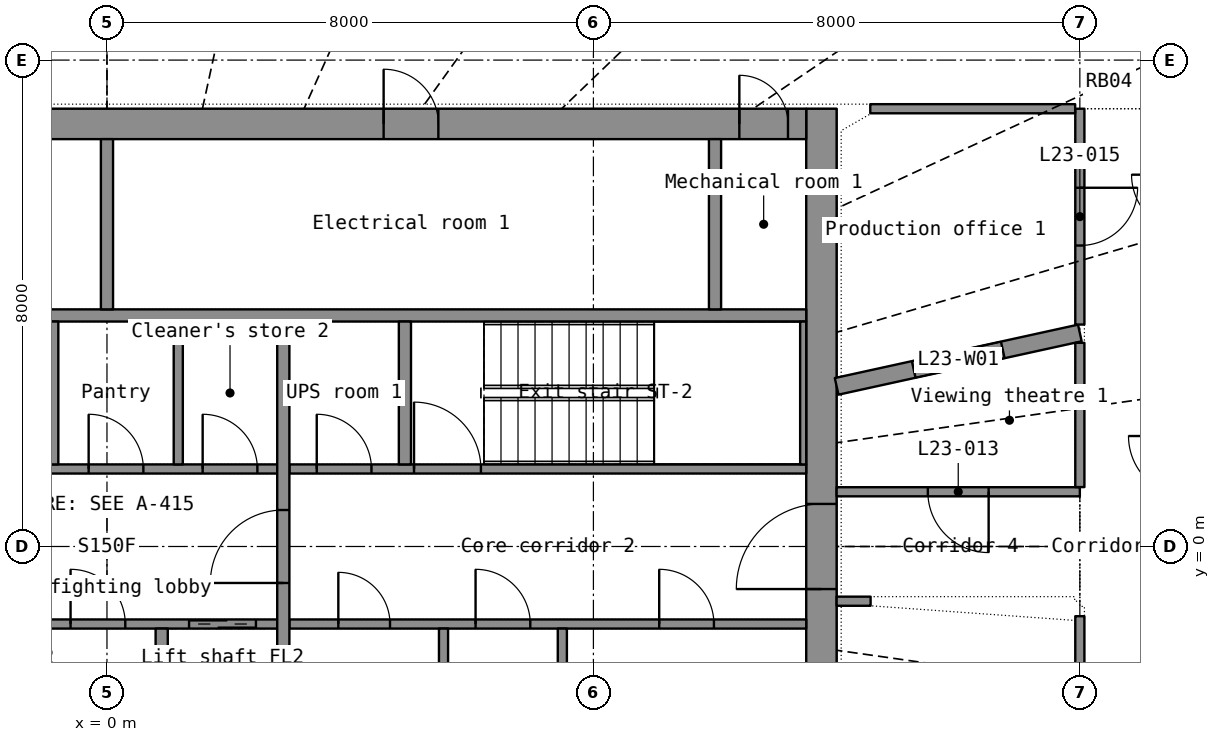
"""IFC4 building model, lengths in metres.
Left out: names, types, materials, properties, quantities, classifications, styles, units other than length and angle.
Written with IfcOpenShell. Run it as: python <this file> out.ifc"""

import sys

from ifc_helpers import new_model, si_unit, direction, frame, frame_2d, origin, place, context, subcontext, project, spatial, rectangle, extrude, element, fill, save


model = new_model("IFC4")
c1 = context("Model", 3, precision=1e-05, world=origin(), true_north=direction((0.0, 1.0)))
c2 = subcontext(c1, "Body", "Model", "MODEL_VIEW")
j1 = project(units=[si_unit("LENGTHUNIT", "METRE"), si_unit("PLANEANGLEUNIT", "RADIAN")], contexts=[c1])
p1 = place(None, origin())
s1 = spatial("IfcSite", under=j1, at=p1, CompositionType="ELEMENT")
p2 = place(p1, origin())
s2 = spatial("IfcBuilding", under=s1, at=p2, CompositionType="ELEMENT")
p3 = place(p2, frame((0.0, 0.0, 100.8)))
s3 = spatial("IfcBuildingStorey", under=s2, at=p3, CompositionType="ELEMENT", Elevation=100.8)
p4 = place(p3, frame((11.75, -7.2, 0.0), z_axis=(0.0, 0.0, 1.0), x_axis=(0.0, 1.0, 0.0)))
e1 = element("IfcWall", 1, at=p4, inside=s3, PredefinedType="SHEAR", context=c2, shape_type="SweptSolid", body=[
    extrude(rectangle(XDim=14.4, YDim=0.5, at=frame_2d((7.2, 0.0))), origin(), (0.0, 0.0, 1.0), 3.3),
])
p5 = place(p4, frame((6.5, 0.0, 0.0)))
e2 = element("IfcOpeningElement", 2, at=p5, cuts=e1, PredefinedType="OPENING", context=c2, shape_type="SweptSolid", body=[
    extrude(rectangle(XDim=1.4, YDim=2.2, at=frame_2d((0.7, 1.1))), frame((0.0, 0.26, 0.0), z_axis=(0.0, -1.0, 0.0), x_axis=(1.0, 0.0, 0.0)), (0.0, 0.0, 1.0), 0.52),
])
p6 = place(p3, frame((-11.5, 6.95, 0.0), z_axis=(0.0, 0.0, 1.0), x_axis=(1.0, 0.0, 0.0)))
e3 = element("IfcWall", 3, at=p6, inside=s3, PredefinedType="SHEAR", context=c2, shape_type="SweptSolid", body=[
    extrude(rectangle(XDim=23.0, YDim=0.5, at=frame_2d((11.5, 0.0))), origin(), (0.0, 0.0, 1.0), 3.3),
])
p7 = place(p6, frame((1.95, 0.0, 0.0)))
e4 = element("IfcOpeningElement", 4, at=p7, cuts=e3, PredefinedType="OPENING", context=c2, shape_type="SweptSolid", body=[
    extrude(rectangle(XDim=1.1, YDim=2.2, at=frame_2d((0.55, 1.1))), frame((0.0, 0.26, 0.0), z_axis=(0.0, -1.0, 0.0), x_axis=(1.0, 0.0, 0.0)), (0.0, 0.0, 1.0), 0.52),
])
p8 = place(p6, frame((8.05, 0.0, 0.0)))
e5 = element("IfcOpeningElement", 5, at=p8, cuts=e3, PredefinedType="OPENING", context=c2, shape_type="SweptSolid", body=[
    extrude(rectangle(XDim=0.9, YDim=2.1, at=frame_2d((0.45, 1.05))), frame((0.0, 0.26, 0.0), z_axis=(0.0, -1.0, 0.0), x_axis=(1.0, 0.0, 0.0)), (0.0, 0.0, 1.0), 0.52),
])
p9 = place(p6, frame((16.05, 0.0, 0.0)))
e6 = element("IfcOpeningElement", 6, at=p9, cuts=e3, PredefinedType="OPENING", context=c2, shape_type="SweptSolid", body=[
    extrude(rectangle(XDim=0.9, YDim=2.1, at=frame_2d((0.45, 1.05))), frame((0.0, 0.26, 0.0), z_axis=(0.0, -1.0, 0.0), x_axis=(1.0, 0.0, 0.0)), (0.0, 0.0, 1.0), 0.52),
])
p10 = place(p6, frame((0.3, 0.0, 0.0)))
e7 = element("IfcOpeningElement", 7, at=p10, cuts=e3, PredefinedType="OPENING", context=c2, shape_type="SweptSolid", body=[
    extrude(rectangle(XDim=0.8, YDim=2.05, at=frame_2d((0.4, 1.025))), frame((0.0, 0.26, 0.0), z_axis=(0.0, -1.0, 0.0), x_axis=(1.0, 0.0, 0.0)), (0.0, 0.0, 1.0), 0.52),
])
p11 = place(p6, frame((21.9, 0.0, 0.0)))
e8 = element("IfcOpeningElement", 8, at=p11, cuts=e3, PredefinedType="OPENING", context=c2, shape_type="SweptSolid", body=[
    extrude(rectangle(XDim=0.8, YDim=2.05, at=frame_2d((0.4, 1.025))), frame((0.0, 0.26, 0.0), z_axis=(0.0, -1.0, 0.0), x_axis=(1.0, 0.0, 0.0)), (0.0, 0.0, 1.0), 0.52),
])
p12 = place(p3, frame((-11.5, 3.8, 0.0), z_axis=(0.0, 0.0, 1.0), x_axis=(1.0, 0.0, 0.0)))
e9 = element("IfcWall", 9, at=p12, inside=s3, PredefinedType="SHEAR", context=c2, shape_type="SweptSolid", body=[
    extrude(rectangle(XDim=23.0, YDim=0.2, at=frame_2d((11.5, 0.0))), origin(), (0.0, 0.0, 1.0), 3.3),
])
p13 = place(p3, frame((10.0, 3.9, 0.0), z_axis=(0.0, 0.0, 1.0), x_axis=(0.0, 1.0, 0.0)))
e10 = element("IfcWall", 10, at=p13, inside=s3, PredefinedType="SHEAR", context=c2, shape_type="SweptSolid", body=[
    extrude(rectangle(XDim=2.8, YDim=0.2, at=frame_2d((1.4, 0.0))), origin(), (0.0, 0.0, 1.0), 3.3),
])
p14 = place(p3, frame((0.0, 3.9, 0.0), z_axis=(0.0, 0.0, 1.0), x_axis=(0.0, 1.0, 0.0)))
e11 = element("IfcWall", 11, at=p14, inside=s3, PredefinedType="PARTITIONING", context=c2, shape_type="SweptSolid", body=[
    extrude(rectangle(XDim=2.8, YDim=0.2, at=frame_2d((1.4, 0.0))), origin(), (0.0, 0.0, 1.0), 3.3),
])
p15 = place(p3, frame((-2.8, -1.275, 0.0), z_axis=(0.0, 0.0, 1.0), x_axis=(1.0, 0.0, 0.0)))
e12 = element("IfcWall", 12, at=p15, inside=s3, PredefinedType="SHEAR", context=c2, shape_type="SweptSolid", body=[
    extrude(rectangle(XDim=5.6, YDim=0.15, at=frame_2d((2.8, 0.0))), origin(), (0.0, 0.0, 1.0), 3.3),
])
p16 = place(p15, frame((4.15, 0.0, 0.0)))
e13 = element("IfcOpeningElement", 13, at=p16, cuts=e12, PredefinedType="OPENING", context=c2, shape_type="SweptSolid", body=[
    extrude(rectangle(XDim=1.1, YDim=2.2, at=frame_2d((0.55, 1.1))), frame((0.0, 0.085, 0.0), z_axis=(0.0, -1.0, 0.0), x_axis=(1.0, 0.0, 0.0)), (0.0, 0.0, 1.0), 0.17),
])
p17 = place(p15, frame((0.326, 0.0, 0.0)))
e14 = element("IfcOpeningElement", 14, at=p17, cuts=e12, PredefinedType="OPENING", context=c2, shape_type="SweptSolid", body=[
    extrude(rectangle(XDim=0.9, YDim=2.1, at=frame_2d((0.45, 1.05))), frame((0.0, 0.085, 0.0), z_axis=(0.0, -1.0, 0.0), x_axis=(1.0, 0.0, 0.0)), (0.0, 0.0, 1.0), 0.17),
])
p18 = place(p15, frame((2.201, 0.0, 0.0)))
e15 = element("IfcOpeningElement", 15, at=p18, cuts=e12, PredefinedType="OPENING", context=c2, shape_type="SweptSolid", body=[
    extrude(rectangle(XDim=0.9, YDim=2.1, at=frame_2d((0.45, 1.05))), frame((0.0, 0.085, 0.0), z_axis=(0.0, -1.0, 0.0), x_axis=(1.0, 0.0, 0.0)), (0.0, 0.0, 1.0), 0.17),
])
p19 = place(p3, frame((3.0, -1.275, 0.0), z_axis=(0.0, 0.0, 1.0), x_axis=(1.0, 0.0, 0.0)))
e16 = element("IfcWall", 16, at=p19, inside=s3, PredefinedType="PARTITIONING", context=c2, shape_type="SweptSolid", body=[
    extrude(rectangle(XDim=8.5, YDim=0.15, at=frame_2d((4.25, 0.0))), origin(), (0.0, 0.0, 1.0), 3.3),
])
p20 = place(p19, frame((0.805, 0.0, 0.0)))
e17 = element("IfcOpeningElement", 17, at=p20, cuts=e16, PredefinedType="OPENING", context=c2, shape_type="SweptSolid", body=[
    extrude(rectangle(XDim=0.85, YDim=2.1, at=frame_2d((0.425, 1.05))), frame((0.0, 0.085, 0.0), z_axis=(0.0, -1.0, 0.0), x_axis=(1.0, 0.0, 0.0)), (0.0, 0.0, 1.0), 0.17),
])
p21 = place(p19, frame((3.062, 0.0, 0.0)))
e18 = element("IfcOpeningElement", 18, at=p21, cuts=e16, PredefinedType="OPENING", context=c2, shape_type="SweptSolid", body=[
    extrude(rectangle(XDim=0.9, YDim=2.1, at=frame_2d((0.45, 1.05))), frame((0.0, 0.085, 0.0), z_axis=(0.0, -1.0, 0.0), x_axis=(1.0, 0.0, 0.0)), (0.0, 0.0, 1.0), 0.17),
])
p22 = place(p19, frame((6.082, 0.0, 0.0)))
e19 = element("IfcOpeningElement", 19, at=p22, cuts=e16, PredefinedType="OPENING", context=c2, shape_type="SweptSolid", body=[
    extrude(rectangle(XDim=0.9, YDim=2.1, at=frame_2d((0.45, 1.05))), frame((0.0, 0.085, 0.0), z_axis=(0.0, -1.0, 0.0), x_axis=(1.0, 0.0, 0.0)), (0.0, 0.0, 1.0), 0.17),
])
p23 = place(p3, frame((-2.8, 1.275, 0.0), z_axis=(0.0, 0.0, 1.0), x_axis=(1.0, 0.0, 0.0)))
e20 = element("IfcWall", 20, at=p23, inside=s3, PredefinedType="SHEAR", context=c2, shape_type="SweptSolid", body=[
    extrude(rectangle(XDim=5.6, YDim=0.15, at=frame_2d((2.8, 0.0))), origin(), (0.0, 0.0, 1.0), 3.3),
])
p24 = place(p23, frame((0.35, 0.0, 0.0)))
e21 = element("IfcOpeningElement", 21, at=p24, cuts=e20, PredefinedType="OPENING", context=c2, shape_type="SweptSolid", body=[
    extrude(rectangle(XDim=1.1, YDim=2.2, at=frame_2d((0.55, 1.1))), frame((0.0, 0.085, 0.0), z_axis=(0.0, -1.0, 0.0), x_axis=(1.0, 0.0, 0.0)), (0.0, 0.0, 1.0), 0.17),
])
p25 = place(p23, frame((2.499, 0.0, 0.0)))
e22 = element("IfcOpeningElement", 22, at=p25, cuts=e20, PredefinedType="OPENING", context=c2, shape_type="SweptSolid", body=[
    extrude(rectangle(XDim=0.9, YDim=2.1, at=frame_2d((0.45, 1.05))), frame((0.0, 0.085, 0.0), z_axis=(0.0, -1.0, 0.0), x_axis=(1.0, 0.0, 0.0)), (0.0, 0.0, 1.0), 0.17),
])
p26 = place(p23, frame((4.374, 0.0, 0.0)))
e23 = element("IfcOpeningElement", 23, at=p26, cuts=e20, PredefinedType="OPENING", context=c2, shape_type="SweptSolid", body=[
    extrude(rectangle(XDim=0.9, YDim=2.1, at=frame_2d((0.45, 1.05))), frame((0.0, 0.085, 0.0), z_axis=(0.0, -1.0, 0.0), x_axis=(1.0, 0.0, 0.0)), (0.0, 0.0, 1.0), 0.17),
])
p27 = place(p3, frame((3.0, 1.275, 0.0), z_axis=(0.0, 0.0, 1.0), x_axis=(1.0, 0.0, 0.0)))
e24 = element("IfcWall", 24, at=p27, inside=s3, PredefinedType="SHEAR", context=c2, shape_type="SweptSolid", body=[
    extrude(rectangle(XDim=8.5, YDim=0.15, at=frame_2d((4.25, 0.0))), origin(), (0.0, 0.0, 1.0), 3.3),
])
p28 = place(p27, frame((2.05, 0.0, 0.0)))
e25 = element("IfcOpeningElement", 25, at=p28, cuts=e24, PredefinedType="OPENING", context=c2, shape_type="SweptSolid", body=[
    extrude(rectangle(XDim=1.1, YDim=2.15, at=frame_2d((0.55, 1.075))), frame((0.0, 0.085, 0.0), z_axis=(0.0, -1.0, 0.0), x_axis=(1.0, 0.0, 0.0)), (0.0, 0.0, 1.0), 0.17),
])
p29 = place(p27, frame((0.45, 0.0, 0.0)))
e26 = element("IfcOpeningElement", 26, at=p29, cuts=e24, PredefinedType="OPENING", context=c2, shape_type="SweptSolid", body=[
    extrude(rectangle(XDim=0.9, YDim=2.1, at=frame_2d((0.45, 1.05))), frame((0.0, 0.085, 0.0), z_axis=(0.0, -1.0, 0.0), x_axis=(1.0, 0.0, 0.0)), (0.0, 0.0, 1.0), 0.17),
])
p30 = place(p3, frame((2.9, -3.7, 0.0), z_axis=(0.0, 0.0, 1.0), x_axis=(0.0, 1.0, 0.0)))
e27 = element("IfcWall", 27, at=p30, inside=s3, PredefinedType="SHEAR", context=c2, shape_type="SweptSolid", body=[
    extrude(rectangle(XDim=7.4, YDim=0.2, at=frame_2d((3.7, 0.0))), origin(), (0.0, 0.0, 1.0), 3.3),
])
p31 = place(p30, frame((3.1, 0.0, 0.0)))
e28 = element("IfcOpeningElement", 28, at=p31, cuts=e27, PredefinedType="OPENING", context=c2, shape_type="SweptSolid", body=[
    extrude(rectangle(XDim=1.2, YDim=2.2, at=frame_2d((0.6, 1.1))), frame((0.0, 0.11, 0.0), z_axis=(0.0, -1.0, 0.0), x_axis=(1.0, 0.0, 0.0)), (0.0, 0.0, 1.0), 0.22),
])
for number, where, z_axis, x_axis in (
    (29, (-0.9, 1.35, 0.0), (0.0, 0.0, 1.0), (0.0, 1.0, 0.0)),
    (30, (0.9, -3.7, 0.0), (0.0, 0.0, 1.0), (0.0, 1.0, 0.0)),
):
    element("IfcWall", number, at=place(p3, frame(where, z_axis=z_axis, x_axis=x_axis)), inside=s3, PredefinedType="SHEAR", context=c2, shape_type="SweptSolid", body=[
        extrude(rectangle(XDim=2.35, YDim=0.2, at=frame_2d((1.175, 0.0))), origin(), (0.0, 0.0, 1.0), 3.3),
    ])
p32 = place(p3, frame((11.45, 1.35, 0.0), z_axis=(0.0, 0.0, 1.0), x_axis=(0.0, 1.0, 0.0)))
e31 = element("IfcWall", 31, at=p32, inside=s3, PredefinedType="SHEAR", context=c2, shape_type="SweptSolid", body=[
    extrude(rectangle(XDim=2.35, YDim=0.1, at=frame_2d((1.175, 0.0))), origin(), (0.0, 0.0, 1.0), 3.3),
])
p33 = place(p3, frame((4.9, 1.35, 0.0), z_axis=(0.0, 0.0, 1.0), x_axis=(0.0, 1.0, 0.0)))
e32 = element("IfcWall", 32, at=p33, inside=s3, PredefinedType="SHEAR", context=c2, shape_type="SweptSolid", body=[
    extrude(rectangle(XDim=2.35, YDim=0.2, at=frame_2d((1.175, 0.0))), origin(), (0.0, 0.0, 1.0), 3.3),
])
for number, where, z_axis, x_axis in (
    (33, (5.535, -3.7, 0.0), (0.0, 0.0, 1.0), (0.0, 1.0, 0.0)),
    (34, (7.489, -3.7, 0.0), (0.0, 0.0, 1.0), (0.0, 1.0, 0.0)),
    (35, (1.173, 1.35, 0.0), (0.0, 0.0, 1.0), (0.0, 1.0, 0.0)),
):
    element("IfcWall", number, at=place(p3, frame(where, z_axis=z_axis, x_axis=x_axis)), inside=s3, PredefinedType="PARTITIONING", context=c2, shape_type="SweptSolid", body=[
        extrude(rectangle(XDim=2.35, YDim=0.15, at=frame_2d((1.175, 0.0))), origin(), (0.0, 0.0, 1.0), 3.3),
    ])
p34 = place(p3, frame((16.0, -1.146, 0.0), z_axis=(0.0, 0.0, 1.0), x_axis=(0.0, -1.0, 0.0)))
e36 = element("IfcWall", 36, at=p34, inside=s3, PredefinedType="PARTITIONING", context=c2, shape_type="SweptSolid", body=[
    extrude(rectangle(XDim=6.053, YDim=0.15, at=frame_2d((3.027, 0.0))), origin(), (0.0, 0.0, 1.0), 2.4),
])
p35 = place(p34, frame((2.427, 0.0, 0.0)))
e37 = element("IfcOpeningElement", 37, at=p35, cuts=e36, PredefinedType="OPENING", context=c2, shape_type="SweptSolid", body=[
    extrude(rectangle(XDim=1.2, YDim=2.2, at=frame_2d((0.6, 1.1))), frame((0.0, 0.085, 0.0), z_axis=(0.0, -1.0, 0.0), x_axis=(1.0, 0.0, 0.0)), (0.0, 0.0, 1.0), 0.17),
])
p36 = place(p3, frame((16.0, 3.512, 0.0), z_axis=(0.0, 0.0, 1.0), x_axis=(-0.976750433, -0.214379551, 0.0)))
e38 = element("IfcWall", 38, at=p36, inside=s3, PredefinedType="PARTITIONING", context=c2, shape_type="SweptSolid", body=[
    extrude(rectangle(XDim=4.095, YDim=0.28, at=frame_2d((2.048, 0.0))), origin(), (0.0, 0.0, 1.0), 2.4),
])
p37 = place(p36, frame((1.298, 0.0, 1.0)))
e39 = element("IfcOpeningElement", 39, at=p37, cuts=e38, PredefinedType="OPENING", context=c2, shape_type="SweptSolid", body=[
    extrude(rectangle(XDim=1.5, YDim=1.2, at=frame_2d((0.75, 0.6))), frame((0.0, 0.15, 0.0), z_axis=(0.0, -1.0, 0.0), x_axis=(1.0, 0.0, 0.0)), (0.0, 0.0, 1.0), 0.3),
])
p38 = place(p3, frame((16.0, 0.9, 0.0), z_axis=(0.0, 0.0, 1.0), x_axis=(-1.0, 0.0, 0.0)))
e40 = element("IfcWall", 40, at=p38, inside=s3, PredefinedType="PARTITIONING", context=c2, shape_type="SweptSolid", body=[
    extrude(rectangle(XDim=4.0, YDim=0.15, at=frame_2d((2.0, 0.0))), origin(), (0.0, 0.0, 1.0), 2.4),
])
p39 = place(p38, frame((1.5, 0.0, 0.0)))
e41 = element("IfcOpeningElement", 41, at=p39, cuts=e40, PredefinedType="OPENING", context=c2, shape_type="SweptSolid", body=[
    extrude(rectangle(XDim=1.0, YDim=2.2, at=frame_2d((0.5, 1.1))), frame((0.0, 0.085, 0.0), z_axis=(0.0, -1.0, 0.0), x_axis=(1.0, 0.0, 0.0)), (0.0, 0.0, 1.0), 0.17),
])
p40 = place(p3, frame((16.0, 7.2, 0.0), z_axis=(0.0, 0.0, 1.0), x_axis=(0.0, -1.0, 0.0)))
e42 = element("IfcWall", 42, at=p40, inside=s3, PredefinedType="PARTITIONING", context=c2, shape_type="SweptSolid", body=[
    extrude(rectangle(XDim=3.55, YDim=0.15, at=frame_2d((1.775, 0.0))), origin(), (0.0, 0.0, 1.0), 2.4),
])
p41 = place(p40, frame((1.3, 0.0, 0.0)))
e43 = element("IfcOpeningElement", 43, at=p41, cuts=e42, PredefinedType="OPENING", context=c2, shape_type="SweptSolid", body=[
    extrude(rectangle(XDim=0.95, YDim=2.15, at=frame_2d((0.475, 1.075))), frame((0.0, 0.085, 0.0), z_axis=(0.0, -1.0, 0.0), x_axis=(1.0, 0.0, 0.0)), (0.0, 0.0, 1.0), 0.17),
])
p42 = place(p3, frame((12.553, 7.2, 0.0), z_axis=(0.0, 0.0, 1.0), x_axis=(1.0, 0.0, 0.0)))
e44 = element("IfcWall", 44, at=p42, inside=s3, PredefinedType="PARTITIONING", context=c2, shape_type="SweptSolid", body=[
    extrude(rectangle(XDim=3.37, YDim=0.15, at=frame_2d((1.685, 0.0))), origin(), (0.0, 0.0, 1.0), 2.4),
])
p43 = place(p3, frame((16.0, 3.35, 0.0), z_axis=(0.0, 0.0, 1.0), x_axis=(0.0, -1.0, 0.0)))
e45 = element("IfcWall", 45, at=p43, inside=s3, PredefinedType="PARTITIONING", context=c2, shape_type="SweptSolid", body=[
    extrude(rectangle(XDim=2.373, YDim=0.15, at=frame_2d((1.187, 0.0))), origin(), (0.0, 0.0, 1.0), 2.4),
])
p44 = place(p3, frame((12.0, -0.9, 0.0), z_axis=(0.0, 0.0, 1.0), x_axis=(1.0, 0.0, 0.0)))
e46 = element("IfcWall", 46, at=p44, inside=s3, PredefinedType="PARTITIONING", context=c2, shape_type="SweptSolid", body=[
    extrude(rectangle(XDim=0.559, YDim=0.15, at=frame_2d((0.279, 0.0))), origin(), (0.0, 0.0, 1.0), 2.4),
])
p45 = place(p9, origin())
e47 = element("IfcDoor", 47, at=p45, inside=s3, OperationType="SINGLE_SWING_LEFT", PredefinedType="DOOR", context=c2, shape_type="SweptSolid", body=[
    extrude(rectangle(XDim=0.9, YDim=2.1, at=frame_2d((0.45, 1.05))), frame((0.0, 0.025, 0.0), z_axis=(0.0, -1.0, 0.0), x_axis=(1.0, 0.0, 0.0)), (0.0, 0.0, 1.0), 0.05),
])
fill(e6, e47)
p46 = place(p11, origin())
e48 = element("IfcDoor", 48, at=p46, inside=s3, OperationType="SINGLE_SWING_LEFT", PredefinedType="DOOR", context=c2, shape_type="SweptSolid", body=[
    extrude(rectangle(XDim=0.8, YDim=2.05, at=frame_2d((0.4, 1.025))), frame((0.0, 0.025, 0.0), z_axis=(0.0, -1.0, 0.0), x_axis=(1.0, 0.0, 0.0)), (0.0, 0.0, 1.0), 0.05),
])
fill(e8, e48)
p47 = place(p5, origin())
e49 = element("IfcDoor", 49, at=p47, inside=s3, OperationType="DOUBLE_DOOR_SINGLE_SWING", PredefinedType="DOOR", context=c2, shape_type="SweptSolid", body=[
    extrude(rectangle(XDim=1.4, YDim=2.2, at=frame_2d((0.7, 1.1))), frame((0.0, 0.025, 0.0), z_axis=(0.0, -1.0, 0.0), x_axis=(1.0, 0.0, 0.0)), (0.0, 0.0, 1.0), 0.05),
])
fill(e2, e49)
p48 = place(p31, origin())
e50 = element("IfcDoor", 50, at=p48, inside=s3, OperationType="SINGLE_SWING_LEFT", PredefinedType="DOOR", context=c2, shape_type="SweptSolid", body=[
    extrude(rectangle(XDim=1.2, YDim=2.2, at=frame_2d((0.6, 1.1))), frame((0.0, 0.025, 0.0), z_axis=(0.0, -1.0, 0.0), x_axis=(1.0, 0.0, 0.0)), (0.0, 0.0, 1.0), 0.05),
])
fill(e28, e50)
p49 = place(p16, origin())
e51 = element("IfcDoor", 51, at=p49, inside=s3, OperationType="DOUBLE_DOOR_SLIDING", PredefinedType="DOOR", context=c2, shape_type="SweptSolid", body=[
    extrude(rectangle(XDim=1.1, YDim=2.2, at=frame_2d((0.55, 1.1))), frame((0.0, 0.025, 0.0), z_axis=(0.0, -1.0, 0.0), x_axis=(1.0, 0.0, 0.0)), (0.0, 0.0, 1.0), 0.05),
])
fill(e13, e51)
p50 = place(p28, origin())
e52 = element("IfcDoor", 52, at=p50, inside=s3, OperationType="SINGLE_SWING_LEFT", PredefinedType="DOOR", context=c2, shape_type="SweptSolid", body=[
    extrude(rectangle(XDim=1.1, YDim=2.15, at=frame_2d((0.55, 1.075))), frame((0.0, 0.025, 0.0), z_axis=(0.0, -1.0, 0.0), x_axis=(1.0, 0.0, 0.0)), (0.0, 0.0, 1.0), 0.05),
])
fill(e25, e52)
p51 = place(p20, origin())
e53 = element("IfcDoor", 53, at=p51, inside=s3, OperationType="SINGLE_SWING_LEFT", PredefinedType="DOOR", context=c2, shape_type="SweptSolid", body=[
    extrude(rectangle(XDim=0.85, YDim=2.1, at=frame_2d((0.425, 1.05))), frame((0.0, 0.025, 0.0), z_axis=(0.0, -1.0, 0.0), x_axis=(1.0, 0.0, 0.0)), (0.0, 0.0, 1.0), 0.05),
])
fill(e17, e53)
p52 = place(p21, origin())
e54 = element("IfcDoor", 54, at=p52, inside=s3, OperationType="SINGLE_SWING_LEFT", PredefinedType="DOOR", context=c2, shape_type="SweptSolid", body=[
    extrude(rectangle(XDim=0.9, YDim=2.1, at=frame_2d((0.45, 1.05))), frame((0.0, 0.025, 0.0), z_axis=(0.0, -1.0, 0.0), x_axis=(1.0, 0.0, 0.0)), (0.0, 0.0, 1.0), 0.05),
])
fill(e18, e54)
p53 = place(p22, origin())
e55 = element("IfcDoor", 55, at=p53, inside=s3, OperationType="SINGLE_SWING_LEFT", PredefinedType="DOOR", context=c2, shape_type="SweptSolid", body=[
    extrude(rectangle(XDim=0.9, YDim=2.1, at=frame_2d((0.45, 1.05))), frame((0.0, 0.025, 0.0), z_axis=(0.0, -1.0, 0.0), x_axis=(1.0, 0.0, 0.0)), (0.0, 0.0, 1.0), 0.05),
])
fill(e19, e55)
p54 = place(p25, origin())
e56 = element("IfcDoor", 56, at=p54, inside=s3, OperationType="SINGLE_SWING_LEFT", PredefinedType="DOOR", context=c2, shape_type="SweptSolid", body=[
    extrude(rectangle(XDim=0.9, YDim=2.1, at=frame_2d((0.45, 1.05))), frame((0.0, 0.025, 0.0), z_axis=(0.0, -1.0, 0.0), x_axis=(1.0, 0.0, 0.0)), (0.0, 0.0, 1.0), 0.05),
])
fill(e22, e56)
p55 = place(p26, origin())
e57 = element("IfcDoor", 57, at=p55, inside=s3, OperationType="SINGLE_SWING_LEFT", PredefinedType="DOOR", context=c2, shape_type="SweptSolid", body=[
    extrude(rectangle(XDim=0.9, YDim=2.1, at=frame_2d((0.45, 1.05))), frame((0.0, 0.025, 0.0), z_axis=(0.0, -1.0, 0.0), x_axis=(1.0, 0.0, 0.0)), (0.0, 0.0, 1.0), 0.05),
])
fill(e23, e57)
p56 = place(p18, origin())
e58 = element("IfcDoor", 58, at=p56, inside=s3, OperationType="SINGLE_SWING_LEFT", PredefinedType="DOOR", context=c2, shape_type="SweptSolid", body=[
    extrude(rectangle(XDim=0.9, YDim=2.1, at=frame_2d((0.45, 1.05))), frame((0.0, 0.025, 0.0), z_axis=(0.0, -1.0, 0.0), x_axis=(1.0, 0.0, 0.0)), (0.0, 0.0, 1.0), 0.05),
])
fill(e15, e58)
p57 = place(p29, origin())
e59 = element("IfcDoor", 59, at=p57, inside=s3, OperationType="SINGLE_SWING_LEFT", PredefinedType="DOOR", context=c2, shape_type="SweptSolid", body=[
    extrude(rectangle(XDim=0.9, YDim=2.1, at=frame_2d((0.45, 1.05))), frame((0.0, 0.025, 0.0), z_axis=(0.0, -1.0, 0.0), x_axis=(1.0, 0.0, 0.0)), (0.0, 0.0, 1.0), 0.05),
])
fill(e26, e59)
p58 = place(p39, origin())
e60 = element("IfcDoor", 60, at=p58, inside=s3, OperationType="SINGLE_SWING_LEFT", PredefinedType="DOOR", context=c2, shape_type="SweptSolid", body=[
    extrude(rectangle(XDim=1.0, YDim=2.2, at=frame_2d((0.5, 1.1))), frame((0.0, 0.025, 0.0), z_axis=(0.0, -1.0, 0.0), x_axis=(1.0, 0.0, 0.0)), (0.0, 0.0, 1.0), 0.05),
])
fill(e41, e60)
p59 = place(p41, origin())
e61 = element("IfcDoor", 61, at=p59, inside=s3, OperationType="SINGLE_SWING_LEFT", PredefinedType="DOOR", context=c2, shape_type="SweptSolid", body=[
    extrude(rectangle(XDim=0.95, YDim=2.15, at=frame_2d((0.475, 1.075))), frame((0.0, 0.025, 0.0), z_axis=(0.0, -1.0, 0.0), x_axis=(1.0, 0.0, 0.0)), (0.0, 0.0, 1.0), 0.05),
])
fill(e43, e61)
p60 = place(p37, origin())
e62 = element("IfcWindow", 62, at=p60, inside=s3, PartitioningType="SINGLE_PANEL", PredefinedType="WINDOW", context=c2, shape_type="SweptSolid", body=[
    extrude(rectangle(XDim=1.5, YDim=1.2, at=frame_2d((0.75, 0.6))), frame((0.0, 0.03, 0.0), z_axis=(0.0, -1.0, 0.0), x_axis=(1.0, 0.0, 0.0)), (0.0, 0.0, 1.0), 0.06),
])
fill(e39, e62)
save(model, sys.argv[1])
